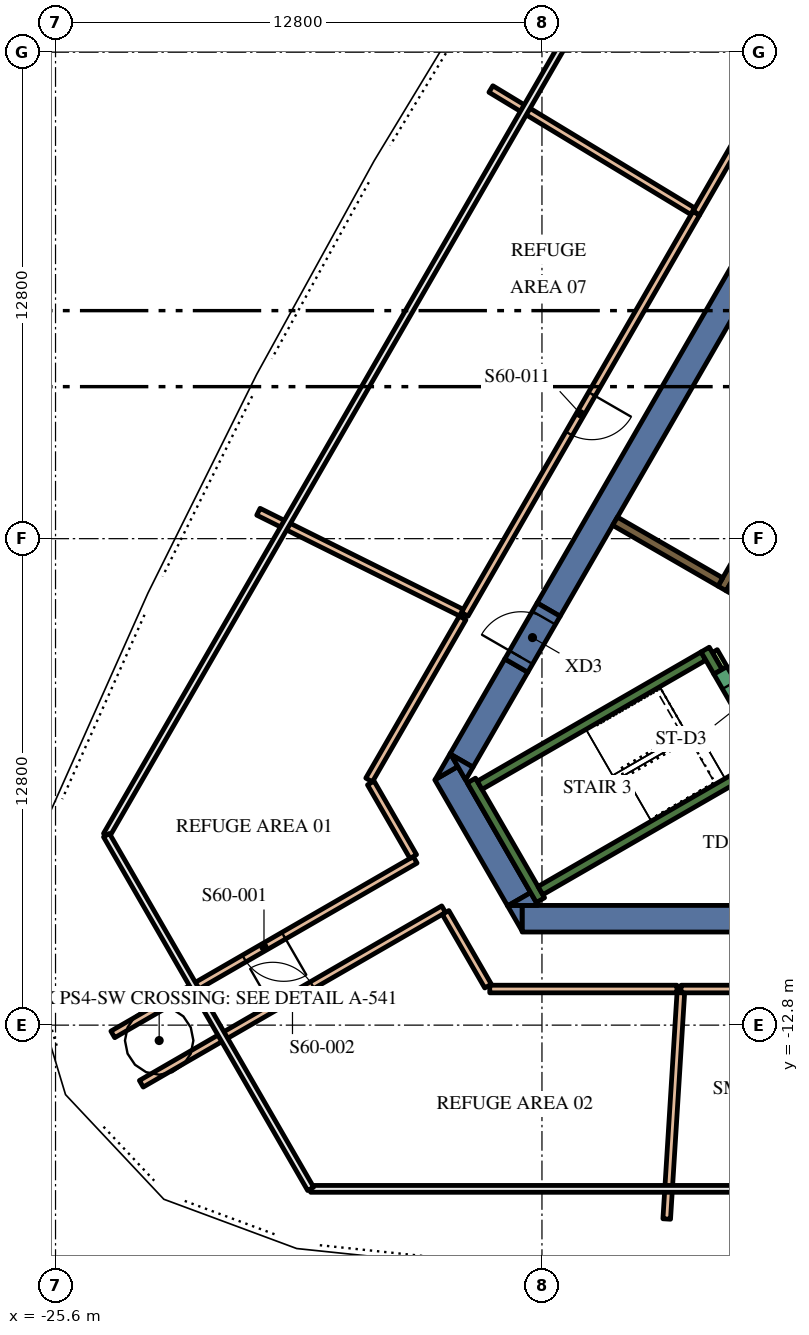
"""IFC4 building model, lengths in metres.
Left out: names, types, materials, properties, quantities, classifications, styles, units other than length and angle.
Written with IfcOpenShell. Run it as: python <this file> out.ifc"""

import sys

from ifc_helpers import new_model, si_unit, direction, frame, frame_2d, origin, place, context, subcontext, project, spatial, polyline, rectangle, outline, extrude, element, fill, save


model = new_model("IFC4")
c1 = context("Model", 3, precision=1e-05, world=origin(), true_north=direction((0.0, 1.0)))
c2 = subcontext(c1, "Body", "Model", "MODEL_VIEW")
j1 = project(units=[si_unit("LENGTHUNIT", "METRE"), si_unit("PLANEANGLEUNIT", "RADIAN")], contexts=[c1])
p1 = place(None, origin())
s1 = spatial("IfcSite", under=j1, at=p1, CompositionType="ELEMENT")
p2 = place(p1, origin())
s2 = spatial("IfcBuilding", under=s1, at=p2, CompositionType="ELEMENT")
p3 = place(p2, frame((0.0, 0.0, 256.2)))
s3 = spatial("IfcBuildingStorey", under=s2, at=p3, CompositionType="ELEMENT", Elevation=256.2)
p4 = place(p3, frame((8.904, -10.0, 0.0), z_axis=(0.0, 0.0, 1.0), x_axis=(-1.0, 0.0, 0.0)))
e1 = element("IfcWall", 1, at=p4, inside=s3, PredefinedType="SOLIDWALL", context=c2, shape_type="SweptSolid", body=[
    extrude(rectangle(XDim=22.226, YDim=0.7, at=frame_2d((11.113, 0.0))), origin(), (0.0, 0.0, 1.0), 5.4),
])
p5 = place(p3, origin())
e2 = element("IfcWall", 2, at=p5, inside=s3, PredefinedType="SOLIDWALL", context=c2, shape_type="SweptSolid", body=[
    extrude(outline(polyline([(-13.712, -9.65), (-13.324, -9.65), (-13.324, -10.322), (-13.712, -9.65)])), origin(), (0.0, 0.0, 1.0), 5.4),
])
p6 = place(p3, frame((-13.402, -9.487, 0.0), z_axis=(0.0, 0.0, 1.0), x_axis=(-0.500020498207, 0.866013568815, 0.0)))
e3 = element("IfcWall", 3, at=p6, inside=s3, PredefinedType="SOLIDWALL", context=c2, shape_type="SweptSolid", body=[
    extrude(rectangle(XDim=3.829, YDim=0.7, at=frame_2d((1.915, 0.0))), origin(), (0.0, 0.0, 1.0), 5.4),
])
e4 = element("IfcWall", 4, at=p5, inside=s3, PredefinedType="SOLIDWALL", context=c2, shape_type="SweptSolid", body=[
    extrude(outline(polyline([(-15.014, -5.995), (-15.611, -6.339), (-15.213, -5.65), (-15.014, -5.995)])), origin(), (0.0, 0.0, 1.0), 5.4),
])
e5 = element("IfcWall", 5, at=p5, inside=s3, PredefinedType="SOLIDWALL", context=c2, shape_type="SweptSolid", body=[
    extrude(outline(polyline([(-12.904, -9.65), (-13.68, -9.65), (-13.098, -9.314), (-12.904, -9.65)])), origin(), (0.0, 0.0, 1.0), 5.4),
])
p7 = place(p3, frame((-13.475, -3.339, 0.0), z_axis=(0.0, 0.0, 1.0), x_axis=(-0.500008214683, -0.866020660983, 0.0)))
e6 = element("IfcWall", 6, at=p7, inside=s3, PredefinedType="SOLIDWALL", context=c2, shape_type="SweptSolid", body=[
    extrude(rectangle(XDim=2.884, YDim=0.7, at=frame_2d((1.442, 0.0))), origin(), (0.0, 0.0, 1.0), 5.4),
])
e7 = element("IfcWall", 7, at=p5, inside=s3, PredefinedType="SOLIDWALL", context=c2, shape_type="SweptSolid", body=[
    extrude(outline(polyline([(-14.809, -6.35), (-15.197, -5.678), (-14.615, -6.014), (-14.809, -6.35)])), origin(), (0.0, 0.0, 1.0), 5.4),
])
p8 = place(p3, frame((-12.625, -1.867, 0.0), z_axis=(0.0, 0.0, 1.0), x_axis=(0.499996974394, 0.866027150612, 0.0)))
e8 = element("IfcWall", 8, at=p8, inside=s3, PredefinedType="SOLIDWALL", context=c2, shape_type="SweptSolid", body=[
    extrude(rectangle(XDim=15.858, YDim=0.7, at=frame_2d((7.929, 0.0))), origin(), (0.0, 0.0, 1.0), 5.4),
])
p9 = place(p3, frame((-12.84, -9.511, 0.0), z_axis=(0.0, 0.0, 1.0), x_axis=(-0.499997733992, 0.866026712061, 0.0)))
e9 = element("IfcWall", 9, at=p9, inside=s3, PredefinedType="SOLIDWALL", context=c2, shape_type="SweptSolid", body=[
    extrude(rectangle(XDim=3.634, YDim=0.25, at=frame_2d((1.817, 0.0))), origin(), (0.0, 0.0, 1.0), 5.4),
])
p10 = place(p3, frame((-14.44, -6.49, 0.0), z_axis=(0.0, 0.0, 1.0), x_axis=(0.866022966069, 0.500004222222, 0.0)))
e10 = element("IfcWall", 10, at=p10, inside=s3, PredefinedType="SOLIDWALL", context=c2, shape_type="SweptSolid", body=[
    extrude(rectangle(XDim=6.8, YDim=0.25, at=frame_2d((3.4, 0.0))), origin(), (0.0, 0.0, 1.0), 5.4),
])
p11 = place(p3, frame((-8.168, -3.503, 0.0), z_axis=(0.0, 0.0, 1.0), x_axis=(-0.499952099219, 0.866053057547, 0.0)))
e11 = element("IfcWall", 11, at=p11, inside=s3, PredefinedType="SOLIDWALL", context=c2, shape_type="SweptSolid", body=[
    extrude(rectangle(XDim=0.675, YDim=0.25, at=frame_2d((0.337, 0.0))), origin(), (0.0, 0.0, 1.0), 5.4),
])
p12 = place(p3, frame((-12.84, -9.261, 0.0), z_axis=(0.0, 0.0, 1.0), x_axis=(0.866016039709, 0.500016218704, 0.0)))
e12 = element("IfcWall", 12, at=p12, inside=s3, PredefinedType="SOLIDWALL", context=c2, shape_type="SweptSolid", body=[
    extrude(rectangle(XDim=7.05, YDim=0.25, at=frame_2d((3.525, 0.0))), origin(), (0.0, 0.0, 1.0), 5.4),
])
p13 = place(p3, frame((-8.06, -1.311, 0.0), z_axis=(0.0, 0.0, 1.0), x_axis=(0.50000273126, 0.866023826885, 0.0)))
e13 = element("IfcWall", 13, at=p13, inside=s3, PredefinedType="SOLIDWALL", context=c2, shape_type="SweptSolid", body=[
    extrude(rectangle(XDim=10.33, YDim=0.25, at=frame_2d((5.165, 0.0))), origin(), (0.0, 0.0, 1.0), 5.4),
])
e14 = element("IfcWall", 14, at=p5, inside=s3, PredefinedType="SOLIDWALL", context=c2, shape_type="SweptSolid", body=[
    extrude(outline(polyline([(-5.922, -2.257), (-5.922, -2.257), (-5.705, -2.382), (-5.83, -2.598), (-6.483, -2.221), (-6.591, -2.033), (-6.591, -2.033), (-6.7, -2.096), (-7.952, -1.373), (-7.827, -1.156), (-5.922, -2.257)])), origin(), (0.0, 0.0, 1.0), 5.4),
])
p14 = place(p3, frame((-8.106, -1.14, 0.0), z_axis=(0.0, 0.0, 1.0), x_axis=(-0.866008981251, 0.500028443584, 0.0)))
e15 = element("IfcWall", 15, at=p14, inside=s3, PredefinedType="SOLIDWALL", context=c2, shape_type="SweptSolid", body=[
    extrude(rectangle(XDim=3.2, YDim=0.25, at=frame_2d((1.6, 0.0))), origin(), (0.0, 0.0, 1.0), 5.4),
])
p15 = place(p3, frame((-8.252, -2.958, 0.0), z_axis=(0.0, 0.0, 1.0), x_axis=(0.500174715838, -0.865924508047, 0.0)))
e16 = element("IfcWall", 16, at=p15, inside=s3, PredefinedType="PARTITIONING", context=c2, shape_type="SweptSolid", body=[
    extrude(rectangle(XDim=0.514, YDim=0.15, at=frame_2d((0.257, 0.0))), origin(), (0.0, 0.0, 1.0), 4.3),
])
p16 = place(p3, frame((-8.103, -3.466, 0.0), z_axis=(0.0, 0.0, 1.0), x_axis=(0.500078061341, -0.865980330357, 0.0)))
e17 = element("IfcWall", 17, at=p16, inside=s3, PredefinedType="SOLIDWALL", context=c2, shape_type="SweptSolid", body=[
    extrude(rectangle(XDim=2.1, YDim=0.4, at=frame_2d((1.05, 0.0))), origin(), (0.0, 0.0, 1.0), 5.4),
])
p17 = place(p16, frame((0.45, 0.0, 0.0)))
e18 = element("IfcOpeningElement", 18, at=p17, cuts=e17, PredefinedType="OPENING", context=c2, shape_type="SweptSolid", body=[
    extrude(rectangle(XDim=1.2, YDim=2.1, at=frame_2d((0.6, 1.05))), frame((0.0, 0.21, 0.0), z_axis=(0.0, -1.0, 0.0), x_axis=(1.0, 0.0, 0.0)), (0.0, 0.0, 1.0), 0.42),
])
p18 = place(p3, frame((-13.475, -3.339, 0.0), z_axis=(0.0, 0.0, 1.0), x_axis=(0.499954529098, 0.86605165483, 0.0)))
e19 = element("IfcWall", 19, at=p18, inside=s3, PredefinedType="SOLIDWALL", context=c2, shape_type="SweptSolid", body=[
    extrude(rectangle(XDim=1.7, YDim=0.7, at=frame_2d((0.85, 0.0))), origin(), (0.0, 0.0, 1.0), 5.4),
])
p19 = place(p18, frame((0.25, 0.0, 0.0)))
e20 = element("IfcOpeningElement", 20, at=p19, cuts=e19, PredefinedType="OPENING", context=c2, shape_type="SweptSolid", body=[
    extrude(rectangle(XDim=1.2, YDim=2.1, at=frame_2d((0.6, 1.05))), frame((0.0, 0.36, 0.0), z_axis=(0.0, -1.0, 0.0), x_axis=(1.0, 0.0, 0.0)), (0.0, 0.0, 1.0), 0.72),
])
p20 = place(p3, frame((-8.741, 8.561, 0.0), z_axis=(0.0, 0.0, 1.0), x_axis=(-0.500009820262, -0.866019733979, 0.0)))
e21 = element("IfcWall", 21, at=p20, inside=s3, PredefinedType="PARTITIONING", context=c2, shape_type="SweptSolid", body=[
    extrude(rectangle(XDim=12.183, YDim=0.2, at=frame_2d((6.092, 0.0))), origin(), (0.0, 0.0, 1.0), 4.3),
])
p21 = place(p20, frame((5.492, 0.0, 0.0)))
e22 = element("IfcOpeningElement", 22, at=p21, cuts=e21, PredefinedType="OPENING", context=c2, shape_type="SweptSolid", body=[
    extrude(rectangle(XDim=1.2, YDim=2.1, at=frame_2d((0.6, 1.05))), frame((0.0, 0.11, 0.0), z_axis=(0.0, -1.0, 0.0), x_axis=(1.0, 0.0, 0.0)), (0.0, 0.0, 1.0), 0.22),
])
p22 = place(p3, frame((-3.175, 18.2, 0.0), z_axis=(0.0, 0.0, 1.0), x_axis=(-0.500001798457, -0.866024365442, 0.0)))
e23 = element("IfcWall", 23, at=p22, inside=s3, PredefinedType="PARTITIONING", context=c2, shape_type="SweptSolid", body=[
    extrude(rectangle(XDim=11.121, YDim=0.2, at=frame_2d((5.561, 0.0))), origin(), (0.0, 0.0, 1.0), 4.3),
])
p23 = place(p22, frame((4.96, 0.0, 0.0)))
e24 = element("IfcOpeningElement", 24, at=p23, cuts=e23, PredefinedType="OPENING", context=c2, shape_type="SweptSolid", body=[
    extrude(rectangle(XDim=1.2, YDim=2.1, at=frame_2d((0.6, 1.05))), frame((0.0, 0.11, 0.0), z_axis=(0.0, -1.0, 0.0), x_axis=(1.0, 0.0, 0.0)), (0.0, 0.0, 1.0), 0.22),
])
p24 = place(p3, frame((-16.137, -8.45, 0.0), z_axis=(0.0, 0.0, 1.0), x_axis=(-0.866028486751, -0.499994660107, 0.0)))
e25 = element("IfcWall", 25, at=p24, inside=s3, PredefinedType="PARTITIONING", context=c2, shape_type="SweptSolid", body=[
    extrude(rectangle(XDim=9.187, YDim=0.2, at=frame_2d((4.594, 0.0))), origin(), (0.0, 0.0, 1.0), 4.3),
])
p25 = place(p24, frame((3.993, 0.0, 0.0)))
e26 = element("IfcOpeningElement", 26, at=p25, cuts=e25, PredefinedType="OPENING", context=c2, shape_type="SweptSolid", body=[
    extrude(rectangle(XDim=1.2, YDim=2.1, at=frame_2d((0.6, 1.05))), frame((0.0, 0.11, 0.0), z_axis=(0.0, -1.0, 0.0), x_axis=(1.0, 0.0, 0.0)), (0.0, 0.0, 1.0), 0.22),
])
p26 = place(p3, frame((-23.343, -14.343, 0.0), z_axis=(0.0, 0.0, 1.0), x_axis=(0.866028486751, 0.499994660107, 0.0)))
e27 = element("IfcWall", 27, at=p26, inside=s3, PredefinedType="PARTITIONING", context=c2, shape_type="SweptSolid", body=[
    extrude(rectangle(XDim=9.187, YDim=0.2, at=frame_2d((4.594, 0.0))), origin(), (0.0, 0.0, 1.0), 4.3),
])
p27 = place(p26, frame((3.993, 0.0, 0.0)))
e28 = element("IfcOpeningElement", 28, at=p27, cuts=e27, PredefinedType="OPENING", context=c2, shape_type="SweptSolid", body=[
    extrude(rectangle(XDim=1.2, YDim=2.1, at=frame_2d((0.6, 1.05))), frame((0.0, 0.11, 0.0), z_axis=(0.0, -1.0, 0.0), x_axis=(1.0, 0.0, 0.0)), (0.0, 0.0, 1.0), 0.22),
])
p28 = place(p3, frame((-8.835, 8.617, 0.0), z_axis=(0.0, 0.0, 1.0), x_axis=(-0.855455591174, 0.517876173935, 0.0)))
e29 = element("IfcWall", 29, at=p28, inside=s3, PredefinedType="PARTITIONING", context=c2, shape_type="SweptSolid", body=[
    extrude(rectangle(XDim=6.206, YDim=0.2, at=frame_2d((3.103, 0.0))), origin(), (0.0, 0.0, 1.0), 4.3),
])
p29 = place(p3, frame((-9.14, -11.85, 0.0), z_axis=(0.0, 0.0, 1.0), x_axis=(1.0, 0.0, 0.0)))
e30 = element("IfcWall", 30, at=p29, inside=s3, PredefinedType="PARTITIONING", context=c2, shape_type="SweptSolid", body=[
    extrude(rectangle(XDim=5.997, YDim=0.2, at=frame_2d((2.999, 0.0))), origin(), (0.0, 0.0, 1.0), 4.3),
])
p30 = place(p29, frame((2.398, 0.0, 0.0)))
e31 = element("IfcOpeningElement", 31, at=p30, cuts=e30, PredefinedType="OPENING", context=c2, shape_type="SweptSolid", body=[
    extrude(rectangle(XDim=1.2, YDim=2.1, at=frame_2d((0.6, 1.05))), frame((0.0, 0.11, 0.0), z_axis=(0.0, -1.0, 0.0), x_axis=(1.0, 0.0, 0.0)), (0.0, 0.0, 1.0), 0.22),
])
p31 = place(p3, frame((-9.146, -11.95, 0.0), z_axis=(0.0, 0.0, 1.0), x_axis=(-0.062232994457, -0.998061648597, 0.0)))
e32 = element("IfcWall", 32, at=p31, inside=s3, PredefinedType="PARTITIONING", context=c2, shape_type="SweptSolid", body=[
    extrude(rectangle(XDim=5.963, YDim=0.2, at=frame_2d((2.981, 0.0))), origin(), (0.0, 0.0, 1.0), 4.3),
])
p32 = place(p3, frame((-20.261, 0.708, 0.0), z_axis=(0.0, 0.0, 1.0), x_axis=(0.895456612303, -0.445148801507, 0.0)))
e33 = element("IfcWall", 33, at=p32, inside=s3, PredefinedType="PARTITIONING", context=c2, shape_type="SweptSolid", body=[
    extrude(rectangle(XDim=5.963, YDim=0.2, at=frame_2d((2.981, 0.0))), origin(), (0.0, 0.0, 1.0), 4.3),
])
for number, where, z_axis, x_axis in (
    (34, (-9.25, -11.85, 0.0), (0.0, 0.0, 1.0), (-1.0, 0.0, 0.0)),
    (35, (-17.349, -6.35, 0.0), (0.0, 0.0, 1.0), (0.5, 0.866, 0.0)),
):
    element("IfcWall", number, at=place(p3, frame(where, z_axis=z_axis, x_axis=x_axis)), inside=s3, PredefinedType="PARTITIONING", context=c2, shape_type="SweptSolid", body=[
        extrude(rectangle(XDim=4.924, YDim=0.2, at=frame_2d((2.462, 0.0))), origin(), (0.0, 0.0, 1.0), 4.3),
    ])
for number, where, z_axis, x_axis in (
    (36, (-14.219, -11.772, 0.0), (0.0, 0.0, 1.0), (-0.5, 0.866, 0.0)),
    (37, (-16.187, -8.364, 0.0), (0.0, 0.0, 1.0), (-0.5, 0.866, 0.0)),
):
    element("IfcWall", number, at=place(p3, frame(where, z_axis=z_axis, x_axis=x_axis)), inside=s3, PredefinedType="PARTITIONING", context=c2, shape_type="SweptSolid", body=[
        extrude(rectangle(XDim=2.236, YDim=0.2, at=frame_2d((1.118, 0.0))), origin(), (0.0, 0.0, 1.0), 4.3),
    ])
p33 = place(p17, origin())
e38 = element("IfcDoor", 38, at=p33, inside=s3, OperationType="SINGLE_SWING_LEFT", PredefinedType="DOOR", context=c2, shape_type="SweptSolid", body=[
    extrude(rectangle(XDim=1.2, YDim=2.1, at=frame_2d((0.6, 1.05))), frame((0.0, 0.025, 0.0), z_axis=(0.0, -1.0, 0.0), x_axis=(1.0, 0.0, 0.0)), (0.0, 0.0, 1.0), 0.05),
])
fill(e18, e38)
p34 = place(p19, origin())
e39 = element("IfcDoor", 39, at=p34, inside=s3, OperationType="SINGLE_SWING_LEFT", PredefinedType="DOOR", context=c2, shape_type="SweptSolid", body=[
    extrude(rectangle(XDim=1.2, YDim=2.1, at=frame_2d((0.6, 1.05))), frame((0.0, 0.025, 0.0), z_axis=(0.0, -1.0, 0.0), x_axis=(1.0, 0.0, 0.0)), (0.0, 0.0, 1.0), 0.05),
])
fill(e20, e39)
p35 = place(p25, origin())
e40 = element("IfcDoor", 40, at=p35, inside=s3, OperationType="SINGLE_SWING_RIGHT", PredefinedType="DOOR", context=c2, shape_type="SweptSolid", body=[
    extrude(rectangle(XDim=1.2, YDim=2.1, at=frame_2d((0.6, 1.05))), frame((0.0, 0.025, 0.0), z_axis=(0.0, -1.0, 0.0), x_axis=(1.0, 0.0, 0.0)), (0.0, 0.0, 1.0), 0.05),
])
fill(e26, e40)
p36 = place(p27, origin())
e41 = element("IfcDoor", 41, at=p36, inside=s3, OperationType="SINGLE_SWING_RIGHT", PredefinedType="DOOR", context=c2, shape_type="SweptSolid", body=[
    extrude(rectangle(XDim=1.2, YDim=2.1, at=frame_2d((0.6, 1.05))), frame((0.0, 0.025, 0.0), z_axis=(0.0, -1.0, 0.0), x_axis=(1.0, 0.0, 0.0)), (0.0, 0.0, 1.0), 0.05),
])
fill(e28, e41)
p37 = place(p21, origin())
e42 = element("IfcDoor", 42, at=p37, inside=s3, OperationType="SINGLE_SWING_RIGHT", PredefinedType="DOOR", context=c2, shape_type="SweptSolid", body=[
    extrude(rectangle(XDim=1.2, YDim=2.1, at=frame_2d((0.6, 1.05))), frame((0.0, 0.025, 0.0), z_axis=(0.0, -1.0, 0.0), x_axis=(1.0, 0.0, 0.0)), (0.0, 0.0, 1.0), 0.05),
])
fill(e22, e42)
save(model, sys.argv[1])
